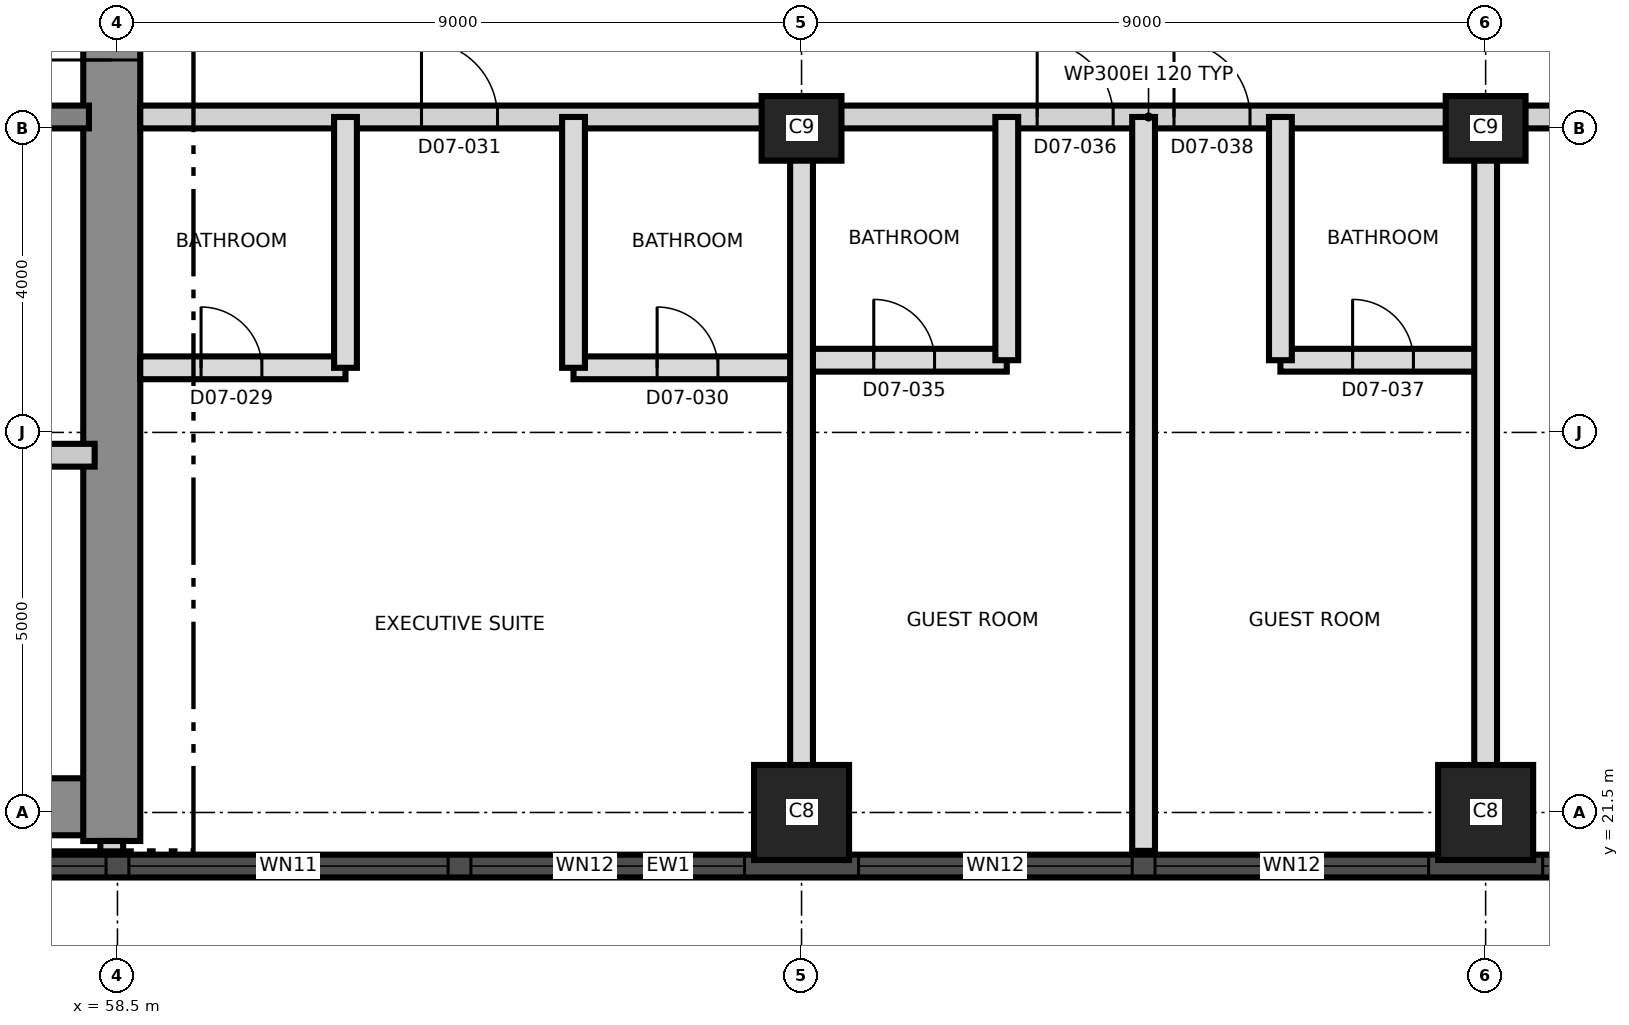
"""IFC4 building model, lengths in metres.
Left out: names, types, materials, properties, quantities, classifications, styles, units other than length and angle.
Written with IfcOpenShell. Run it as: python <this file> out.ifc"""

import sys

from ifc_helpers import new_model, si_unit, direction, frame, frame_2d, origin, origin_2d, place, context, subcontext, project, spatial, rectangle, extrude, element, fill, save


model = new_model("IFC4")
c1 = context("Model", 3, precision=1e-05, world=origin(), true_north=direction((0.0, 1.0)))
c2 = subcontext(c1, "Body", "Model", "MODEL_VIEW")
j1 = project(units=[si_unit("LENGTHUNIT", "METRE"), si_unit("PLANEANGLEUNIT", "RADIAN")], contexts=[c1])
p1 = place(None, origin())
s1 = spatial("IfcSite", under=j1, at=p1, CompositionType="ELEMENT")
p2 = place(p1, origin())
s2 = spatial("IfcBuilding", under=s1, at=p2, CompositionType="ELEMENT")
p3 = place(p2, frame((0.0, 0.0, 90.8)))
s3 = spatial("IfcBuildingStorey", under=s2, at=p3, CompositionType="ELEMENT", Elevation=90.8)
p4 = place(p3, frame((31.125, 21.575, 0.0), z_axis=(0.0, 0.0, 1.0), x_axis=(1.0, 0.0, 0.0)))
e1 = element("IfcWall", 1, at=p4, inside=s3, PredefinedType="SHEAR", context=c2, shape_type="SweptSolid", body=[
    extrude(rectangle(XDim=27.0, YDim=0.75, at=frame_2d((13.5, 0.0))), origin(), (0.0, 0.0, 1.0), 3.7),
])
p5 = place(p3, frame((58.425, 21.125, 0.0), z_axis=(0.0, 0.0, 1.0), x_axis=(0.0, 1.0, 0.0)))
e2 = element("IfcWall", 2, at=p5, inside=s3, PredefinedType="SHEAR", context=c2, shape_type="SweptSolid", body=[
    extrude(rectangle(XDim=18.75, YDim=0.75, at=frame_2d((9.375, 0.0))), origin(), (0.0, 0.0, 1.0), 3.7),
])
p6 = place(p5, frame((10.275, 0.0, 0.0)))
e3 = element("IfcOpeningElement", 3, at=p6, cuts=e2, PredefinedType="OPENING", context=c2, shape_type="SweptSolid", body=[
    extrude(rectangle(XDim=1.2, YDim=2.1, at=frame_2d((0.6, 1.05))), frame((0.0, 0.385, 0.0), z_axis=(0.0, -1.0, 0.0), x_axis=(1.0, 0.0, 0.0)), (0.0, 0.0, 1.0), 0.77),
])
p7 = place(p3, frame((31.875, 30.65, 0.0), z_axis=(0.0, 0.0, 1.0), x_axis=(1.0, 0.0, 0.0)))
e4 = element("IfcWall", 4, at=p7, inside=s3, PredefinedType="SHEAR", context=c2, shape_type="SweptSolid", body=[
    extrude(rectangle(XDim=26.25, YDim=0.3, at=frame_2d((13.125, 0.0))), origin(), (0.0, 0.0, 1.0), 3.7),
])
p8 = place(p7, frame((24.625, 0.0, 0.0)))
e5 = element("IfcOpeningElement", 5, at=p8, cuts=e4, PredefinedType="OPENING", context=c2, shape_type="SweptSolid", body=[
    extrude(rectangle(XDim=1.0, YDim=2.1, at=frame_2d((0.5, 1.05))), frame((0.0, 0.16, 0.0), z_axis=(0.0, -1.0, 0.0), x_axis=(1.0, 0.0, 0.0)), (0.0, 0.0, 1.0), 0.32),
])
p9 = place(p7, frame((11.425, 0.0, 0.0)))
e6 = element("IfcOpeningElement", 6, at=p9, cuts=e4, PredefinedType="OPENING", context=c2, shape_type="SweptSolid", body=[
    extrude(rectangle(XDim=1.0, YDim=2.1, at=frame_2d((0.5, 1.05))), frame((0.0, 0.16, 0.0), z_axis=(0.0, -1.0, 0.0), x_axis=(1.0, 0.0, 0.0)), (0.0, 0.0, 1.0), 0.32),
])
for number, where, z_axis, x_axis in (
    (7, (67.5, 21.5, 0.0), (0.0, 0.0, 1.0), (1.0, 0.0, 0.0)),
    (8, (76.5, 21.5, 0.0), (0.0, 0.0, 1.0), (1.0, 0.0, 0.0)),
):
    element("IfcColumn", number, at=place(p3, frame(where, z_axis=z_axis, x_axis=x_axis)), inside=s3, PredefinedType="COLUMN", context=c2, shape_type="SweptSolid", body=[
        extrude(rectangle(XDim=1.25, YDim=1.25, at=origin_2d()), origin(), (0.0, 0.0, 1.0), 3.7),
    ])
for number, where, z_axis, x_axis in (
    (9, (67.5, 30.5, 0.0), (0.0, 0.0, 1.0), (1.0, 0.0, 0.0)),
    (10, (76.5, 30.5, 0.0), (0.0, 0.0, 1.0), (1.0, 0.0, 0.0)),
):
    element("IfcColumn", number, at=place(p3, frame(where, z_axis=z_axis, x_axis=x_axis)), inside=s3, PredefinedType="COLUMN", context=c2, shape_type="SweptSolid", body=[
        extrude(rectangle(XDim=1.05, YDim=0.85, at=origin_2d()), origin(), (0.0, 0.0, 1.0), 3.7),
    ])
p10 = place(p3, frame((44.011, 20.795, 0.0), z_axis=(0.0, 0.0, 1.0), x_axis=(1.0, 0.0, 0.0)))
e11 = element("IfcWall", 11, at=p10, inside=s3, PredefinedType="SOLIDWALL", context=c2, shape_type="SweptSolid", body=[
    extrude(rectangle(XDim=43.476, YDim=0.3, at=frame_2d((21.738, 0.0))), origin(), (0.0, 0.0, 1.0), 3.4),
])
p11 = place(p10, frame((1.845, 0.0, 0.3)))
e12 = element("IfcOpeningElement", 12, at=p11, cuts=e11, PredefinedType="OPENING", context=c2, shape_type="SweptSolid", body=[
    extrude(rectangle(XDim=1.8, YDim=2.4, at=frame_2d((0.9, 1.2))), frame((0.0, 0.16, 0.0), z_axis=(0.0, -1.0, 0.0), x_axis=(1.0, 0.0, 0.0)), (0.0, 0.0, 1.0), 0.32),
])
p12 = place(p10, frame((5.639, 0.0, 0.9)))
e13 = element("IfcOpeningElement", 13, at=p12, cuts=e11, PredefinedType="OPENING", context=c2, shape_type="SweptSolid", body=[
    extrude(rectangle(XDim=4.2, YDim=1.5, at=frame_2d((2.1, 0.75))), frame((0.0, 0.16, 0.0), z_axis=(0.0, -1.0, 0.0), x_axis=(1.0, 0.0, 0.0)), (0.0, 0.0, 1.0), 0.32),
])
p13 = place(p10, frame((10.139, 0.0, 0.9)))
e14 = element("IfcOpeningElement", 14, at=p13, cuts=e11, PredefinedType="OPENING", context=c2, shape_type="SweptSolid", body=[
    extrude(rectangle(XDim=4.2, YDim=1.5, at=frame_2d((2.1, 0.75))), frame((0.0, 0.16, 0.0), z_axis=(0.0, -1.0, 0.0), x_axis=(1.0, 0.0, 0.0)), (0.0, 0.0, 1.0), 0.32),
])
p14 = place(p10, frame((14.639, 0.0, 0.9)))
e15 = element("IfcOpeningElement", 15, at=p14, cuts=e11, PredefinedType="OPENING", context=c2, shape_type="SweptSolid", body=[
    extrude(rectangle(XDim=4.2, YDim=1.5, at=frame_2d((2.1, 0.75))), frame((0.0, 0.16, 0.0), z_axis=(0.0, -1.0, 0.0), x_axis=(1.0, 0.0, 0.0)), (0.0, 0.0, 1.0), 0.32),
])
p15 = place(p10, frame((19.139, 0.0, 0.9)))
e16 = element("IfcOpeningElement", 16, at=p15, cuts=e11, PredefinedType="OPENING", context=c2, shape_type="SweptSolid", body=[
    extrude(rectangle(XDim=3.6, YDim=1.5, at=frame_2d((1.8, 0.75))), frame((0.0, 0.16, 0.0), z_axis=(0.0, -1.0, 0.0), x_axis=(1.0, 0.0, 0.0)), (0.0, 0.0, 1.0), 0.32),
])
p16 = place(p10, frame((24.239, 0.0, 0.9)))
e17 = element("IfcOpeningElement", 17, at=p16, cuts=e11, PredefinedType="OPENING", context=c2, shape_type="SweptSolid", body=[
    extrude(rectangle(XDim=3.6, YDim=1.5, at=frame_2d((1.8, 0.75))), frame((0.0, 0.16, 0.0), z_axis=(0.0, -1.0, 0.0), x_axis=(1.0, 0.0, 0.0)), (0.0, 0.0, 1.0), 0.32),
])
p17 = place(p10, frame((28.139, 0.0, 0.9)))
e18 = element("IfcOpeningElement", 18, at=p17, cuts=e11, PredefinedType="OPENING", context=c2, shape_type="SweptSolid", body=[
    extrude(rectangle(XDim=3.6, YDim=1.5, at=frame_2d((1.8, 0.75))), frame((0.0, 0.16, 0.0), z_axis=(0.0, -1.0, 0.0), x_axis=(1.0, 0.0, 0.0)), (0.0, 0.0, 1.0), 0.32),
])
p18 = place(p10, frame((33.239, 0.0, 0.9)))
e19 = element("IfcOpeningElement", 19, at=p18, cuts=e11, PredefinedType="OPENING", context=c2, shape_type="SweptSolid", body=[
    extrude(rectangle(XDim=3.6, YDim=1.5, at=frame_2d((1.8, 0.75))), frame((0.0, 0.16, 0.0), z_axis=(0.0, -1.0, 0.0), x_axis=(1.0, 0.0, 0.0)), (0.0, 0.0, 1.0), 0.32),
])
p19 = place(p10, frame((37.139, 0.0, 0.9)))
e20 = element("IfcOpeningElement", 20, at=p19, cuts=e11, PredefinedType="OPENING", context=c2, shape_type="SweptSolid", body=[
    extrude(rectangle(XDim=3.6, YDim=1.5, at=frame_2d((1.8, 0.75))), frame((0.0, 0.16, 0.0), z_axis=(0.0, -1.0, 0.0), x_axis=(1.0, 0.0, 0.0)), (0.0, 0.0, 1.0), 0.32),
])
p20 = place(p3, frame((55.8, 26.2, 0.0), z_axis=(0.0, 0.0, 1.0), x_axis=(1.0, 0.0, 0.0)))
e21 = element("IfcWall", 21, at=p20, inside=s3, PredefinedType="PARTITIONING", context=c2, shape_type="SweptSolid", body=[
    extrude(rectangle(XDim=2.4, YDim=0.3, at=frame_2d((1.2, 0.0))), origin(), (0.0, 0.0, 1.0), 3.4),
])
p21 = place(p20, frame((0.75, 0.0, 0.0)))
e22 = element("IfcOpeningElement", 22, at=p21, cuts=e21, PredefinedType="OPENING", context=c2, shape_type="SweptSolid", body=[
    extrude(rectangle(XDim=0.9, YDim=2.1, at=frame_2d((0.45, 1.05))), frame((0.0, 0.16, 0.0), z_axis=(0.0, -1.0, 0.0), x_axis=(1.0, 0.0, 0.0)), (0.0, 0.0, 1.0), 0.32),
])
p22 = place(p3, frame((58.8, 27.35, 0.0), z_axis=(0.0, 0.0, 1.0), x_axis=(1.0, 0.0, 0.0)))
e23 = element("IfcWall", 23, at=p22, inside=s3, PredefinedType="PARTITIONING", context=c2, shape_type="SweptSolid", body=[
    extrude(rectangle(XDim=2.7, YDim=0.3, at=frame_2d((1.35, 0.0))), origin(), (0.0, 0.0, 1.0), 3.4),
])
p23 = place(p22, frame((0.8, 0.0, 0.0)))
e24 = element("IfcOpeningElement", 24, at=p23, cuts=e23, PredefinedType="OPENING", context=c2, shape_type="SweptSolid", body=[
    extrude(rectangle(XDim=0.8, YDim=2.1, at=frame_2d((0.4, 1.05))), frame((0.0, 0.16, 0.0), z_axis=(0.0, -1.0, 0.0), x_axis=(1.0, 0.0, 0.0)), (0.0, 0.0, 1.0), 0.32),
])
p24 = place(p3, frame((64.5, 27.35, 0.0), z_axis=(0.0, 0.0, 1.0), x_axis=(1.0, 0.0, 0.0)))
e25 = element("IfcWall", 25, at=p24, inside=s3, PredefinedType="PARTITIONING", context=c2, shape_type="SweptSolid", body=[
    extrude(rectangle(XDim=3.0, YDim=0.3, at=frame_2d((1.5, 0.0))), origin(), (0.0, 0.0, 1.0), 3.4),
])
p25 = place(p24, frame((1.1, 0.0, 0.0)))
e26 = element("IfcOpeningElement", 26, at=p25, cuts=e25, PredefinedType="OPENING", context=c2, shape_type="SweptSolid", body=[
    extrude(rectangle(XDim=0.8, YDim=2.1, at=frame_2d((0.4, 1.05))), frame((0.0, 0.16, 0.0), z_axis=(0.0, -1.0, 0.0), x_axis=(1.0, 0.0, 0.0)), (0.0, 0.0, 1.0), 0.32),
])
p26 = place(p3, frame((67.5, 27.45, 0.0), z_axis=(0.0, 0.0, 1.0), x_axis=(1.0, 0.0, 0.0)))
e27 = element("IfcWall", 27, at=p26, inside=s3, PredefinedType="PARTITIONING", context=c2, shape_type="SweptSolid", body=[
    extrude(rectangle(XDim=2.7, YDim=0.3, at=frame_2d((1.35, 0.0))), origin(), (0.0, 0.0, 1.0), 3.4),
])
p27 = place(p26, frame((0.95, 0.0, 0.0)))
e28 = element("IfcOpeningElement", 28, at=p27, cuts=e27, PredefinedType="OPENING", context=c2, shape_type="SweptSolid", body=[
    extrude(rectangle(XDim=0.8, YDim=2.1, at=frame_2d((0.4, 1.05))), frame((0.0, 0.16, 0.0), z_axis=(0.0, -1.0, 0.0), x_axis=(1.0, 0.0, 0.0)), (0.0, 0.0, 1.0), 0.32),
])
p28 = place(p3, frame((73.8, 27.45, 0.0), z_axis=(0.0, 0.0, 1.0), x_axis=(1.0, 0.0, 0.0)))
e29 = element("IfcWall", 29, at=p28, inside=s3, PredefinedType="PARTITIONING", context=c2, shape_type="SweptSolid", body=[
    extrude(rectangle(XDim=2.7, YDim=0.3, at=frame_2d((1.35, 0.0))), origin(), (0.0, 0.0, 1.0), 3.4),
])
p29 = place(p28, frame((0.95, 0.0, 0.0)))
e30 = element("IfcOpeningElement", 30, at=p29, cuts=e29, PredefinedType="OPENING", context=c2, shape_type="SweptSolid", body=[
    extrude(rectangle(XDim=0.8, YDim=2.1, at=frame_2d((0.4, 1.05))), frame((0.0, 0.16, 0.0), z_axis=(0.0, -1.0, 0.0), x_axis=(1.0, 0.0, 0.0)), (0.0, 0.0, 1.0), 0.32),
])
p30 = place(p3, frame((58.8, 30.65, 0.0), z_axis=(0.0, 0.0, 1.0), x_axis=(1.0, 0.0, 0.0)))
e31 = element("IfcWall", 31, at=p30, inside=s3, PredefinedType="PARTITIONING", context=c2, shape_type="SweptSolid", body=[
    extrude(rectangle(XDim=26.53, YDim=0.3, at=frame_2d((13.265, 0.0))), origin(), (0.0, 0.0, 1.0), 3.4),
])
p31 = place(p30, frame((3.7, 0.0, 0.0)))
e32 = element("IfcOpeningElement", 32, at=p31, cuts=e31, PredefinedType="OPENING", context=c2, shape_type="SweptSolid", body=[
    extrude(rectangle(XDim=1.0, YDim=2.4, at=frame_2d((0.5, 1.2))), frame((0.0, 0.16, 0.0), z_axis=(0.0, -1.0, 0.0), x_axis=(1.0, 0.0, 0.0)), (0.0, 0.0, 1.0), 0.32),
])
p32 = place(p30, frame((11.8, 0.0, 0.0)))
e33 = element("IfcOpeningElement", 33, at=p32, cuts=e31, PredefinedType="OPENING", context=c2, shape_type="SweptSolid", body=[
    extrude(rectangle(XDim=1.0, YDim=2.1, at=frame_2d((0.5, 1.05))), frame((0.0, 0.16, 0.0), z_axis=(0.0, -1.0, 0.0), x_axis=(1.0, 0.0, 0.0)), (0.0, 0.0, 1.0), 0.32),
])
p33 = place(p30, frame((13.6, 0.0, 0.0)))
e34 = element("IfcOpeningElement", 34, at=p33, cuts=e31, PredefinedType="OPENING", context=c2, shape_type="SweptSolid", body=[
    extrude(rectangle(XDim=1.0, YDim=2.1, at=frame_2d((0.5, 1.05))), frame((0.0, 0.16, 0.0), z_axis=(0.0, -1.0, 0.0), x_axis=(1.0, 0.0, 0.0)), (0.0, 0.0, 1.0), 0.32),
])
p34 = place(p30, frame((18.85, 0.0, 0.0)))
e35 = element("IfcOpeningElement", 35, at=p34, cuts=e31, PredefinedType="OPENING", context=c2, shape_type="SweptSolid", body=[
    extrude(rectangle(XDim=1.0, YDim=2.1, at=frame_2d((0.5, 1.05))), frame((0.0, 0.16, 0.0), z_axis=(0.0, -1.0, 0.0), x_axis=(1.0, 0.0, 0.0)), (0.0, 0.0, 1.0), 0.32),
])
p35 = place(p30, frame((24.7, 0.0, 0.0)))
e36 = element("IfcOpeningElement", 36, at=p35, cuts=e31, PredefinedType="OPENING", context=c2, shape_type="SweptSolid", body=[
    extrude(rectangle(XDim=1.0, YDim=2.1, at=frame_2d((0.5, 1.05))), frame((0.0, 0.16, 0.0), z_axis=(0.0, -1.0, 0.0), x_axis=(1.0, 0.0, 0.0)), (0.0, 0.0, 1.0), 0.32),
])
for number, where, z_axis, x_axis in (
    (37, (61.5, 27.35, 0.0), (0.0, 0.0, 1.0), (0.0, 1.0, 0.0)),
    (38, (64.5, 27.35, 0.0), (0.0, 0.0, 1.0), (0.0, 1.0, 0.0)),
):
    element("IfcWall", number, at=place(p3, frame(where, z_axis=z_axis, x_axis=x_axis)), inside=s3, PredefinedType="PARTITIONING", context=c2, shape_type="SweptSolid", body=[
        extrude(rectangle(XDim=3.3, YDim=0.3, at=frame_2d((1.65, 0.0))), origin(), (0.0, 0.0, 1.0), 3.4),
    ])
p36 = place(p3, frame((67.5, 20.995, 0.0), z_axis=(0.0, 0.0, 1.0), x_axis=(0.0, 1.0, 0.0)))
e39 = element("IfcWall", 39, at=p36, inside=s3, PredefinedType="PARTITIONING", context=c2, shape_type="SweptSolid", body=[
    extrude(rectangle(XDim=9.655, YDim=0.3, at=frame_2d((4.827, 0.0))), origin(), (0.0, 0.0, 1.0), 3.4),
])
p37 = place(p3, frame((70.2, 27.45, 0.0), z_axis=(0.0, 0.0, 1.0), x_axis=(0.0, 1.0, 0.0)))
e40 = element("IfcWall", 40, at=p37, inside=s3, PredefinedType="PARTITIONING", context=c2, shape_type="SweptSolid", body=[
    extrude(rectangle(XDim=3.2, YDim=0.3, at=frame_2d((1.6, 0.0))), origin(), (0.0, 0.0, 1.0), 3.4),
])
p38 = place(p3, frame((72.0, 20.995, 0.0), z_axis=(0.0, 0.0, 1.0), x_axis=(0.0, 1.0, 0.0)))
e41 = element("IfcWall", 41, at=p38, inside=s3, PredefinedType="PARTITIONING", context=c2, shape_type="SweptSolid", body=[
    extrude(rectangle(XDim=9.655, YDim=0.3, at=frame_2d((4.827, 0.0))), origin(), (0.0, 0.0, 1.0), 3.4),
])
p39 = place(p3, frame((73.8, 27.45, 0.0), z_axis=(0.0, 0.0, 1.0), x_axis=(0.0, 1.0, 0.0)))
e42 = element("IfcWall", 42, at=p39, inside=s3, PredefinedType="PARTITIONING", context=c2, shape_type="SweptSolid", body=[
    extrude(rectangle(XDim=3.2, YDim=0.3, at=frame_2d((1.6, 0.0))), origin(), (0.0, 0.0, 1.0), 3.4),
])
p40 = place(p3, frame((76.5, 20.995, 0.0), z_axis=(0.0, 0.0, 1.0), x_axis=(0.0, 1.0, 0.0)))
e43 = element("IfcWall", 43, at=p40, inside=s3, PredefinedType="PARTITIONING", context=c2, shape_type="SweptSolid", body=[
    extrude(rectangle(XDim=9.655, YDim=0.3, at=frame_2d((4.827, 0.0))), origin(), (0.0, 0.0, 1.0), 3.4),
])
p41 = place(p3, frame((58.425, 21.125, 0.0), z_axis=(0.0, 0.0, 1.0), x_axis=(0.0, -1.0, 0.0)))
e44 = element("IfcWall", 44, at=p41, inside=s3, PredefinedType="PARTITIONING", context=c2, shape_type="SweptSolid", body=[
    extrude(rectangle(XDim=0.17, YDim=0.3, at=frame_2d((0.085, 0.0))), origin(), (0.0, 0.0, 1.0), 3.4),
])
p42 = place(p13, origin())
e45 = element("IfcWindow", 45, at=p42, inside=s3, PartitioningType="SINGLE_PANEL", PredefinedType="WINDOW", context=c2, shape_type="SweptSolid", body=[
    extrude(rectangle(XDim=4.2, YDim=1.5, at=frame_2d((2.1, 0.75))), frame((0.0, 0.03, 0.0), z_axis=(0.0, -1.0, 0.0), x_axis=(1.0, 0.0, 0.0)), (0.0, 0.0, 1.0), 0.06),
])
fill(e14, e45)
p43 = place(p14, origin())
e46 = element("IfcWindow", 46, at=p43, inside=s3, PartitioningType="SINGLE_PANEL", PredefinedType="WINDOW", context=c2, shape_type="SweptSolid", body=[
    extrude(rectangle(XDim=4.2, YDim=1.5, at=frame_2d((2.1, 0.75))), frame((0.0, 0.03, 0.0), z_axis=(0.0, -1.0, 0.0), x_axis=(1.0, 0.0, 0.0)), (0.0, 0.0, 1.0), 0.06),
])
fill(e15, e46)
p44 = place(p15, origin())
e47 = element("IfcWindow", 47, at=p44, inside=s3, PartitioningType="SINGLE_PANEL", PredefinedType="WINDOW", context=c2, shape_type="SweptSolid", body=[
    extrude(rectangle(XDim=3.6, YDim=1.5, at=frame_2d((1.8, 0.75))), frame((0.0, 0.03, 0.0), z_axis=(0.0, -1.0, 0.0), x_axis=(1.0, 0.0, 0.0)), (0.0, 0.0, 1.0), 0.06),
])
fill(e16, e47)
p45 = place(p16, origin())
e48 = element("IfcWindow", 48, at=p45, inside=s3, PartitioningType="SINGLE_PANEL", PredefinedType="WINDOW", context=c2, shape_type="SweptSolid", body=[
    extrude(rectangle(XDim=3.6, YDim=1.5, at=frame_2d((1.8, 0.75))), frame((0.0, 0.03, 0.0), z_axis=(0.0, -1.0, 0.0), x_axis=(1.0, 0.0, 0.0)), (0.0, 0.0, 1.0), 0.06),
])
fill(e17, e48)
p46 = place(p17, origin())
e49 = element("IfcWindow", 49, at=p46, inside=s3, PartitioningType="SINGLE_PANEL", PredefinedType="WINDOW", context=c2, shape_type="SweptSolid", body=[
    extrude(rectangle(XDim=3.6, YDim=1.5, at=frame_2d((1.8, 0.75))), frame((0.0, 0.03, 0.0), z_axis=(0.0, -1.0, 0.0), x_axis=(1.0, 0.0, 0.0)), (0.0, 0.0, 1.0), 0.06),
])
fill(e18, e49)
p47 = place(p18, origin())
e50 = element("IfcWindow", 50, at=p47, inside=s3, PartitioningType="SINGLE_PANEL", PredefinedType="WINDOW", context=c2, shape_type="SweptSolid", body=[
    extrude(rectangle(XDim=3.6, YDim=1.5, at=frame_2d((1.8, 0.75))), frame((0.0, 0.03, 0.0), z_axis=(0.0, -1.0, 0.0), x_axis=(1.0, 0.0, 0.0)), (0.0, 0.0, 1.0), 0.06),
])
fill(e19, e50)
p48 = place(p6, origin())
e51 = element("IfcDoor", 51, at=p48, inside=s3, OperationType="SINGLE_SWING_LEFT", PredefinedType="DOOR", context=c2, shape_type="SweptSolid", body=[
    extrude(rectangle(XDim=1.2, YDim=2.1, at=frame_2d((0.6, 1.05))), frame((0.0, 0.025, 0.0), z_axis=(0.0, -1.0, 0.0), x_axis=(1.0, 0.0, 0.0)), (0.0, 0.0, 1.0), 0.05),
])
fill(e3, e51)
p49 = place(p23, origin())
e52 = element("IfcDoor", 52, at=p49, inside=s3, OperationType="SINGLE_SWING_LEFT", PredefinedType="DOOR", context=c2, shape_type="SweptSolid", body=[
    extrude(rectangle(XDim=0.8, YDim=2.1, at=frame_2d((0.4, 1.05))), frame((0.0, 0.025, 0.0), z_axis=(0.0, -1.0, 0.0), x_axis=(1.0, 0.0, 0.0)), (0.0, 0.0, 1.0), 0.05),
])
fill(e24, e52)
p50 = place(p25, origin())
e53 = element("IfcDoor", 53, at=p50, inside=s3, OperationType="SINGLE_SWING_RIGHT", PredefinedType="DOOR", context=c2, shape_type="SweptSolid", body=[
    extrude(rectangle(XDim=0.8, YDim=2.1, at=frame_2d((0.4, 1.05))), frame((0.0, 0.025, 0.0), z_axis=(0.0, -1.0, 0.0), x_axis=(1.0, 0.0, 0.0)), (0.0, 0.0, 1.0), 0.05),
])
fill(e26, e53)
p51 = place(p31, origin())
e54 = element("IfcDoor", 54, at=p51, inside=s3, OperationType="SINGLE_SWING_LEFT", PredefinedType="DOOR", context=c2, shape_type="SweptSolid", body=[
    extrude(rectangle(XDim=1.0, YDim=2.4, at=frame_2d((0.5, 1.2))), frame((0.0, 0.025, 0.0), z_axis=(0.0, -1.0, 0.0), x_axis=(1.0, 0.0, 0.0)), (0.0, 0.0, 1.0), 0.05),
])
fill(e32, e54)
p52 = place(p27, origin())
e55 = element("IfcDoor", 55, at=p52, inside=s3, OperationType="SINGLE_SWING_LEFT", PredefinedType="DOOR", context=c2, shape_type="SweptSolid", body=[
    extrude(rectangle(XDim=0.8, YDim=2.1, at=frame_2d((0.4, 1.05))), frame((0.0, 0.025, 0.0), z_axis=(0.0, -1.0, 0.0), x_axis=(1.0, 0.0, 0.0)), (0.0, 0.0, 1.0), 0.05),
])
fill(e28, e55)
p53 = place(p32, origin())
e56 = element("IfcDoor", 56, at=p53, inside=s3, OperationType="SINGLE_SWING_LEFT", PredefinedType="DOOR", context=c2, shape_type="SweptSolid", body=[
    extrude(rectangle(XDim=1.0, YDim=2.1, at=frame_2d((0.5, 1.05))), frame((0.0, 0.025, 0.0), z_axis=(0.0, -1.0, 0.0), x_axis=(1.0, 0.0, 0.0)), (0.0, 0.0, 1.0), 0.05),
])
fill(e33, e56)
p54 = place(p29, origin())
e57 = element("IfcDoor", 57, at=p54, inside=s3, OperationType="SINGLE_SWING_LEFT", PredefinedType="DOOR", context=c2, shape_type="SweptSolid", body=[
    extrude(rectangle(XDim=0.8, YDim=2.1, at=frame_2d((0.4, 1.05))), frame((0.0, 0.025, 0.0), z_axis=(0.0, -1.0, 0.0), x_axis=(1.0, 0.0, 0.0)), (0.0, 0.0, 1.0), 0.05),
])
fill(e30, e57)
p55 = place(p33, origin())
e58 = element("IfcDoor", 58, at=p55, inside=s3, OperationType="SINGLE_SWING_RIGHT", PredefinedType="DOOR", context=c2, shape_type="SweptSolid", body=[
    extrude(rectangle(XDim=1.0, YDim=2.1, at=frame_2d((0.5, 1.05))), frame((0.0, 0.025, 0.0), z_axis=(0.0, -1.0, 0.0), x_axis=(1.0, 0.0, 0.0)), (0.0, 0.0, 1.0), 0.05),
])
fill(e34, e58)
save(model, sys.argv[1])
